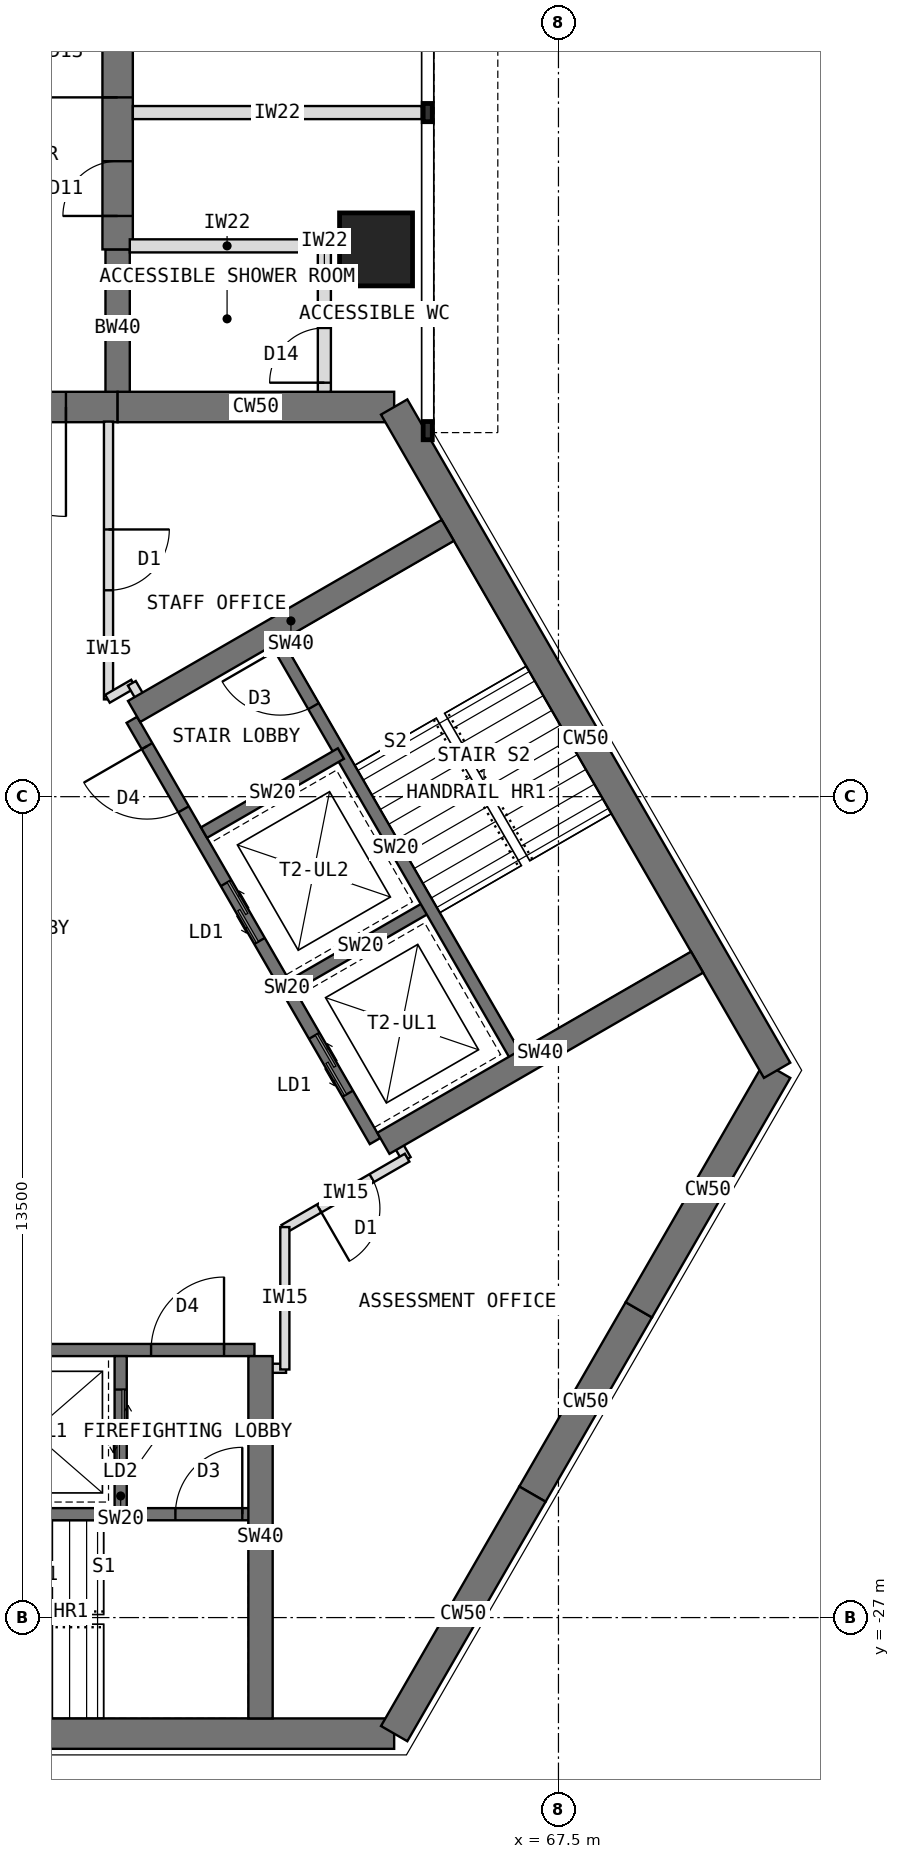
"""IFC4 building model, lengths in metres.
Left out: names, types, materials, properties, quantities, classifications, styles, units other than length and angle.
Written with IfcOpenShell. Run it as: python <this file> out.ifc"""

import sys

from ifc_helpers import new_model, si_unit, direction, frame, frame_2d, origin, origin_2d, place, context, subcontext, project, spatial, rectangle, extrude, element, fill, save


model = new_model("IFC4")
c1 = context("Model", 3, precision=1e-05, world=origin(), true_north=direction((0.0, 1.0)))
c2 = subcontext(c1, "Body", "Model", "MODEL_VIEW")
j1 = project(units=[si_unit("LENGTHUNIT", "METRE"), si_unit("PLANEANGLEUNIT", "RADIAN")], contexts=[c1])
p1 = place(None, origin())
s1 = spatial("IfcSite", under=j1, at=p1, CompositionType="ELEMENT")
p2 = place(p1, origin())
s2 = spatial("IfcBuilding", under=s1, at=p2, CompositionType="ELEMENT")
p3 = place(p2, frame((0.0, 0.0, 174.5)))
s3 = spatial("IfcBuildingStorey", under=s2, at=p3, CompositionType="ELEMENT", Elevation=174.5)
p4 = place(p3, frame((64.798, -7.092, 0.0), z_axis=(0.0, 0.0, 1.0), x_axis=(-1.0, 0.0, 0.0)))
e1 = element("IfcWall", 1, at=p4, inside=s3, PredefinedType="SHEAR", context=c2, shape_type="SweptSolid", body=[
    extrude(rectangle(XDim=4.548, YDim=0.5, at=frame_2d((2.274, 0.0))), origin(), (0.0, 0.0, 1.0), 4.0),
])
p5 = place(p3, frame((60.25, -7.092, 0.0), z_axis=(0.0, 0.0, 1.0), x_axis=(-1.0, 0.0, 0.0)))
e2 = element("IfcWall", 2, at=p5, inside=s3, PredefinedType="SHEAR", context=c2, shape_type="SweptSolid", body=[
    extrude(rectangle(XDim=3.5, YDim=0.5, at=frame_2d((1.75, 0.0))), origin(), (0.0, 0.0, 1.0), 4.0),
])
p6 = place(p5, frame((0.85, 0.0, 0.0)))
e3 = element("IfcOpeningElement", 3, at=p6, cuts=e2, PredefinedType="OPENING", context=c2, shape_type="SweptSolid", body=[
    extrude(rectangle(XDim=1.8, YDim=2.1, at=frame_2d((0.9, 1.05))), frame((0.0, 0.26, 0.0), z_axis=(0.0, -1.0, 0.0), x_axis=(1.0, 0.0, 0.0)), (0.0, 0.0, 1.0), 0.52),
])
p7 = place(p3, frame((52.202, -28.908, 0.0), z_axis=(0.0, 0.0, 1.0), x_axis=(1.0, 0.0, 0.0)))
e4 = element("IfcWall", 4, at=p7, inside=s3, PredefinedType="SHEAR", context=c2, shape_type="SweptSolid", body=[
    extrude(rectangle(XDim=12.596, YDim=0.5, at=frame_2d((6.298, 0.0))), origin(), (0.0, 0.0, 1.0), 4.0),
])
p8 = place(p3, frame((64.798, -28.908, 0.0), z_axis=(0.0, 0.0, 1.0), x_axis=(0.499984222037, 0.866034513004, 0.0)))
e5 = element("IfcWall", 5, at=p8, inside=s3, PredefinedType="SHEAR", context=c2, shape_type="SweptSolid", body=[
    extrude(rectangle(XDim=4.548, YDim=0.5, at=frame_2d((2.274, 0.0))), origin(), (0.0, 0.0, 1.0), 4.0),
])
p9 = place(p3, frame((67.072, -24.97, 0.0), z_axis=(0.0, 0.0, 1.0), x_axis=(0.500010275428, 0.866019471182, 0.0)))
e6 = element("IfcWall", 6, at=p9, inside=s3, PredefinedType="SHEAR", context=c2, shape_type="SweptSolid", body=[
    extrude(rectangle(XDim=3.5, YDim=0.5, at=frame_2d((1.75, 0.0))), origin(), (0.0, 0.0, 1.0), 4.0),
])
p10 = place(p3, frame((68.822, -21.939, 0.0), z_axis=(0.0, 0.0, 1.0), x_axis=(0.500024481964, 0.866011268655, 0.0)))
e7 = element("IfcWall", 7, at=p10, inside=s3, PredefinedType="SHEAR", context=c2, shape_type="SweptSolid", body=[
    extrude(rectangle(XDim=4.548, YDim=0.5, at=frame_2d((2.274, 0.0))), origin(), (0.0, 0.0, 1.0), 4.0),
])
p11 = place(p3, frame((71.096, -18.0, 0.0), z_axis=(0.0, 0.0, 1.0), x_axis=(-0.500005998175, 0.866021940709, 0.0)))
e8 = element("IfcWall", 8, at=p11, inside=s3, PredefinedType="SHEAR", context=c2, shape_type="SweptSolid", body=[
    extrude(rectangle(XDim=12.596, YDim=0.5, at=frame_2d((6.298, 0.0))), origin(), (0.0, 0.0, 1.0), 4.0),
])
p12 = place(p3, frame((60.25, -7.092, 0.0), z_axis=(0.0, 0.0, 1.0), x_axis=(0.0, 1.0, 0.0)))
e9 = element("IfcWall", 9, at=p12, inside=s3, PredefinedType="SHEAR", context=c2, shape_type="SweptSolid", body=[
    extrude(rectangle(XDim=2.592, YDim=0.4, at=frame_2d((1.296, 0.0))), origin(), (0.0, 0.0, 1.0), 4.0),
])
p13 = place(p3, frame((60.25, -4.5, 0.0), z_axis=(0.0, 0.0, 1.0), x_axis=(0.0, 1.0, 0.0)))
e10 = element("IfcWall", 10, at=p13, inside=s3, PredefinedType="SHEAR", context=c2, shape_type="SweptSolid", body=[
    extrude(rectangle(XDim=13.2, YDim=0.5, at=frame_2d((6.6, 0.0))), origin(), (0.0, 0.0, 1.0), 4.0),
])
p14 = place(p13, frame((0.55, 0.0, 0.0)))
e11 = element("IfcOpeningElement", 11, at=p14, cuts=e10, PredefinedType="OPENING", context=c2, shape_type="SweptSolid", body=[
    extrude(rectangle(XDim=0.9, YDim=2.1, at=frame_2d((0.45, 1.05))), frame((0.0, 0.26, 0.0), z_axis=(0.0, -1.0, 0.0), x_axis=(1.0, 0.0, 0.0)), (0.0, 0.0, 1.0), 0.52),
])
p15 = place(p13, frame((2.5, 0.0, 0.0)))
e12 = element("IfcOpeningElement", 12, at=p15, cuts=e10, PredefinedType="OPENING", context=c2, shape_type="SweptSolid", body=[
    extrude(rectangle(XDim=1.5, YDim=2.1, at=frame_2d((0.75, 1.05))), frame((0.0, 0.26, 0.0), z_axis=(0.0, -1.0, 0.0), x_axis=(1.0, 0.0, 0.0)), (0.0, 0.0, 1.0), 0.52),
])
p16 = place(p3, frame((64.5, -4.5, 0.0), z_axis=(0.0, 0.0, 1.0), x_axis=(1.0, 0.0, 0.0)))
e13 = element("IfcColumn", 13, at=p16, inside=s3, PredefinedType="COLUMN", context=c2, shape_type="SweptSolid", body=[
    extrude(rectangle(XDim=1.2, YDim=1.2, at=origin_2d()), origin(), (0.0, 0.0, 1.0), 4.0),
])
p17 = place(p3, frame((54.5, -22.6, 0.0), z_axis=(0.0, 0.0, 1.0), x_axis=(1.0, 0.0, 0.0)))
e14 = element("IfcWall", 14, at=p17, inside=s3, PredefinedType="SHEAR", context=c2, shape_type="SweptSolid", body=[
    extrude(rectangle(XDim=8.0, YDim=0.2, at=frame_2d((4.0, 0.0))), origin(), (0.0, 0.0, 1.0), 4.0),
])
p18 = place(p17, frame((6.3, 0.0, 0.0)))
e15 = element("IfcOpeningElement", 15, at=p18, cuts=e14, PredefinedType="OPENING", context=c2, shape_type="SweptSolid", body=[
    extrude(rectangle(XDim=1.2, YDim=2.1, at=frame_2d((0.6, 1.05))), frame((0.0, 0.11, 0.0), z_axis=(0.0, -1.0, 0.0), x_axis=(1.0, 0.0, 0.0)), (0.0, 0.0, 1.0), 0.22),
])
p19 = place(p17, frame((0.9, 0.0, 0.0)))
e16 = element("IfcOpeningElement", 16, at=p19, cuts=e14, PredefinedType="OPENING", context=c2, shape_type="SweptSolid", body=[
    extrude(rectangle(XDim=1.1, YDim=2.2, at=frame_2d((0.55, 1.1))), frame((0.0, 0.11, 0.0), z_axis=(0.0, -1.0, 0.0), x_axis=(1.0, 0.0, 0.0)), (0.0, 0.0, 1.0), 0.22),
])
p20 = place(p3, frame((60.3, -22.7, 0.0), z_axis=(0.0, 0.0, 1.0), x_axis=(0.0, -1.0, 0.0)))
e17 = element("IfcWall", 17, at=p20, inside=s3, PredefinedType="SHEAR", context=c2, shape_type="SweptSolid", body=[
    extrude(rectangle(XDim=2.6, YDim=0.2, at=frame_2d((1.3, 0.0))), origin(), (0.0, 0.0, 1.0), 4.0),
])
p21 = place(p20, frame((0.55, 0.0, 0.0)))
e18 = element("IfcOpeningElement", 18, at=p21, cuts=e17, PredefinedType="OPENING", context=c2, shape_type="SweptSolid", body=[
    extrude(rectangle(XDim=1.3, YDim=2.2, at=frame_2d((0.65, 1.1))), frame((0.0, 0.11, 0.0), z_axis=(0.0, -1.0, 0.0), x_axis=(1.0, 0.0, 0.0)), (0.0, 0.0, 1.0), 0.22),
])
p22 = place(p3, frame((54.5, -25.3, 0.0), z_axis=(0.0, 0.0, 1.0), x_axis=(1.0, 0.0, 0.0)))
e19 = element("IfcWall", 19, at=p22, inside=s3, PredefinedType="SHEAR", context=c2, shape_type="SweptSolid", body=[
    extrude(rectangle(XDim=8.0, YDim=0.2, at=frame_2d((4.0, 0.0))), origin(), (0.0, 0.0, 1.0), 4.0),
])
p23 = place(p22, frame((6.7, 0.0, 0.0)))
e20 = element("IfcOpeningElement", 20, at=p23, cuts=e19, PredefinedType="OPENING", context=c2, shape_type="SweptSolid", body=[
    extrude(rectangle(XDim=1.1, YDim=2.1, at=frame_2d((0.55, 1.05))), frame((0.0, 0.11, 0.0), z_axis=(0.0, -1.0, 0.0), x_axis=(1.0, 0.0, 0.0)), (0.0, 0.0, 1.0), 0.22),
])
p24 = place(p3, frame((62.6, -22.7, 0.0), z_axis=(0.0, 0.0, 1.0), x_axis=(0.0, -1.0, 0.0)))
e21 = element("IfcWall", 21, at=p24, inside=s3, PredefinedType="SHEAR", context=c2, shape_type="SweptSolid", body=[
    extrude(rectangle(XDim=5.958, YDim=0.4, at=frame_2d((2.979, 0.0))), origin(), (0.0, 0.0, 1.0), 4.0),
])
p25 = place(p3, frame((64.484, -19.164, 0.0), z_axis=(0.0, 0.0, 1.0), x_axis=(-0.49999894854, 0.866026010844, 0.0)))
e22 = element("IfcWall", 22, at=p25, inside=s3, PredefinedType="SHEAR", context=c2, shape_type="SweptSolid", body=[
    extrude(rectangle(XDim=8.0, YDim=0.2, at=frame_2d((4.0, 0.0))), origin(), (0.0, 0.0, 1.0), 4.0),
])
p26 = place(p25, frame((6.3, 0.0, 0.0)))
e23 = element("IfcOpeningElement", 23, at=p26, cuts=e22, PredefinedType="OPENING", context=c2, shape_type="SweptSolid", body=[
    extrude(rectangle(XDim=1.2, YDim=2.1, at=frame_2d((0.6, 1.05))), frame((0.0, 0.11, 0.0), z_axis=(0.0, -1.0, 0.0), x_axis=(1.0, 0.0, 0.0)), (0.0, 0.0, 1.0), 0.22),
])
p27 = place(p25, frame((0.9, 0.0, 0.0)))
e24 = element("IfcOpeningElement", 24, at=p27, cuts=e22, PredefinedType="OPENING", context=c2, shape_type="SweptSolid", body=[
    extrude(rectangle(XDim=1.1, YDim=2.2, at=frame_2d((0.55, 1.1))), frame((0.0, 0.11, 0.0), z_axis=(0.0, -1.0, 0.0), x_axis=(1.0, 0.0, 0.0)), (0.0, 0.0, 1.0), 0.22),
])
p28 = place(p25, frame((3.8, 0.0, 0.0)))
e25 = element("IfcOpeningElement", 25, at=p28, cuts=e22, PredefinedType="OPENING", context=c2, shape_type="SweptSolid", body=[
    extrude(rectangle(XDim=1.1, YDim=2.2, at=frame_2d((0.55, 1.1))), frame((0.0, 0.11, 0.0), z_axis=(0.0, -1.0, 0.0), x_axis=(1.0, 0.0, 0.0)), (0.0, 0.0, 1.0), 0.22),
])
p29 = place(p3, frame((63.12, -16.603, 0.0), z_axis=(0.0, 0.0, 1.0), x_axis=(0.866062058628, 0.499936506574, 0.0)))
e26 = element("IfcWall", 26, at=p29, inside=s3, PredefinedType="SHEAR", context=c2, shape_type="SweptSolid", body=[
    extrude(rectangle(XDim=2.6, YDim=0.2, at=frame_2d((1.3, 0.0))), origin(), (0.0, 0.0, 1.0), 4.0),
])
p30 = place(p3, frame((61.67, -14.091, 0.0), z_axis=(0.0, 0.0, 1.0), x_axis=(0.86603858612, 0.49997716683, 0.0)))
e27 = element("IfcWall", 27, at=p30, inside=s3, PredefinedType="SHEAR", context=c2, shape_type="SweptSolid", body=[
    extrude(rectangle(XDim=2.6, YDim=0.2, at=frame_2d((1.3, 0.0))), origin(), (0.0, 0.0, 1.0), 4.0),
])
p31 = place(p3, frame((66.822, -17.814, 0.0), z_axis=(0.0, 0.0, 1.0), x_axis=(-0.49999894854, 0.866026010844, 0.0)))
e28 = element("IfcWall", 28, at=p31, inside=s3, PredefinedType="SHEAR", context=c2, shape_type="SweptSolid", body=[
    extrude(rectangle(XDim=8.0, YDim=0.2, at=frame_2d((4.0, 0.0))), origin(), (0.0, 0.0, 1.0), 4.0),
])
p32 = place(p31, frame((6.7, 0.0, 0.0)))
e29 = element("IfcOpeningElement", 29, at=p32, cuts=e28, PredefinedType="OPENING", context=c2, shape_type="SweptSolid", body=[
    extrude(rectangle(XDim=1.1, YDim=2.1, at=frame_2d((0.55, 1.05))), frame((0.0, 0.11, 0.0), z_axis=(0.0, -1.0, 0.0), x_axis=(1.0, 0.0, 0.0)), (0.0, 0.0, 1.0), 0.22),
])
p33 = place(p3, frame((60.52, -12.099, 0.0), z_axis=(0.0, 0.0, 1.0), x_axis=(0.86602319114, 0.500003832394, 0.0)))
e30 = element("IfcWall", 30, at=p33, inside=s3, PredefinedType="SHEAR", context=c2, shape_type="SweptSolid", body=[
    extrude(rectangle(XDim=5.958, YDim=0.4, at=frame_2d((2.979, 0.0))), origin(), (0.0, 0.0, 1.0), 4.0),
])
p34 = place(p3, frame((64.62, -19.201, 0.0), z_axis=(0.0, 0.0, 1.0), x_axis=(0.866012946976, 0.500021575205, 0.0)))
e31 = element("IfcWall", 31, at=p34, inside=s3, PredefinedType="SHEAR", context=c2, shape_type="SweptSolid", body=[
    extrude(rectangle(XDim=5.958, YDim=0.4, at=frame_2d((2.979, 0.0))), origin(), (0.0, 0.0, 1.0), 4.0),
])
p35 = place(p3, frame((60.5, -2.25, 0.0), z_axis=(0.0, 0.0, 1.0), x_axis=(1.0, 0.0, 0.0)))
e32 = element("IfcWall", 32, at=p35, inside=s3, PredefinedType="PARTITIONING", context=c2, shape_type="SweptSolid", body=[
    extrude(rectangle(XDim=4.75, YDim=0.215, at=frame_2d((2.375, 0.0))), origin(), (0.0, 0.0, 1.0), 3.8),
])
p36 = place(p3, frame((63.65, -6.842, 0.0), z_axis=(0.0, 0.0, 1.0), x_axis=(0.0, 1.0, 0.0)))
e33 = element("IfcWall", 33, at=p36, inside=s3, PredefinedType="PARTITIONING", context=c2, shape_type="SweptSolid", body=[
    extrude(rectangle(XDim=2.4, YDim=0.215, at=frame_2d((1.2, 0.0))), origin(), (0.0, 0.0, 1.0), 3.8),
])
p37 = place(p36, frame((0.15, 0.0, 0.0)))
e34 = element("IfcOpeningElement", 34, at=p37, cuts=e33, PredefinedType="OPENING", context=c2, shape_type="SweptSolid", body=[
    extrude(rectangle(XDim=0.9, YDim=2.1, at=frame_2d((0.45, 1.05))), frame((0.0, 0.117, 0.0), z_axis=(0.0, -1.0, 0.0), x_axis=(1.0, 0.0, 0.0)), (0.0, 0.0, 1.0), 0.235),
])
p38 = place(p3, frame((60.45, -4.442, 0.0), z_axis=(0.0, 0.0, 1.0), x_axis=(1.0, 0.0, 0.0)))
e35 = element("IfcWall", 35, at=p38, inside=s3, PredefinedType="PARTITIONING", context=c2, shape_type="SweptSolid", body=[
    extrude(rectangle(XDim=3.2, YDim=0.215, at=frame_2d((1.6, 0.0))), origin(), (0.0, 0.0, 1.0), 3.267),
])
p39 = place(p3, frame((63.02, -22.9, 0.0), z_axis=(0.0, 0.0, 1.0), x_axis=(-1.0, 0.0, 0.0)))
e36 = element("IfcWall", 36, at=p39, inside=s3, PredefinedType="PARTITIONING", context=c2, shape_type="SweptSolid", body=[
    extrude(rectangle(XDim=0.43, YDim=0.15, at=frame_2d((0.215, 0.0))), origin(), (0.0, 0.0, 1.0), 3.8),
])
p40 = place(p3, frame((60.1, -7.332, 0.0), z_axis=(0.0, 0.0, 1.0), x_axis=(0.0, -1.0, 0.0)))
e37 = element("IfcWall", 37, at=p40, inside=s3, PredefinedType="PARTITIONING", context=c2, shape_type="SweptSolid", body=[
    extrude(rectangle(XDim=4.568, YDim=0.15, at=frame_2d((2.284, 0.0))), origin(), (0.0, 0.0, 1.0), 3.8),
])
p41 = place(p40, frame((1.774, 0.0, 0.0)))
e38 = element("IfcOpeningElement", 38, at=p41, cuts=e37, PredefinedType="OPENING", context=c2, shape_type="SweptSolid", body=[
    extrude(rectangle(XDim=1.0, YDim=2.1, at=frame_2d((0.5, 1.05))), frame((0.0, 0.085, 0.0), z_axis=(0.0, -1.0, 0.0), x_axis=(1.0, 0.0, 0.0)), (0.0, 0.0, 1.0), 0.17),
])
p42 = place(p3, frame((60.083, -11.89, 0.0), z_axis=(0.0, 0.0, 1.0), x_axis=(0.865831790172, 0.50033519877, 0.0)))
e39 = element("IfcWall", 39, at=p42, inside=s3, PredefinedType="PARTITIONING", context=c2, shape_type="SweptSolid", body=[
    extrude(rectangle(XDim=0.494, YDim=0.15, at=frame_2d((0.247, 0.0))), origin(), (0.0, 0.0, 1.0), 3.8),
])
for number, where, z_axis, x_axis in (
    (40, (60.483, -11.635, 0.0), (0.0, 0.0, 1.0), (0.5, -0.866, 0.0)),
    (41, (64.789, -19.092, 0.0), (0.0, 0.0, 1.0), (0.5, -0.866, 0.0)),
):
    element("IfcWall", number, at=place(p3, frame(where, z_axis=z_axis, x_axis=x_axis)), inside=s3, PredefinedType="PARTITIONING", context=c2, shape_type="SweptSolid", body=[
        extrude(rectangle(XDim=0.43, YDim=0.15, at=frame_2d((0.215, 0.0))), origin(), (0.0, 0.0, 1.0), 3.8),
    ])
p43 = place(p3, frame((65.011, -19.437, 0.0), z_axis=(0.0, 0.0, 1.0), x_axis=(-0.865982457891, -0.500074377092, 0.0)))
e42 = element("IfcWall", 42, at=p43, inside=s3, PredefinedType="PARTITIONING", context=c2, shape_type="SweptSolid", body=[
    extrude(rectangle(XDim=2.342, YDim=0.15, at=frame_2d((1.171, 0.0))), origin(), (0.0, 0.0, 1.0), 3.8),
])
p44 = place(p43, frame((0.671, 0.0, 0.0)))
e43 = element("IfcOpeningElement", 43, at=p44, cuts=e42, PredefinedType="OPENING", context=c2, shape_type="SweptSolid", body=[
    extrude(rectangle(XDim=1.0, YDim=2.1, at=frame_2d((0.5, 1.05))), frame((0.0, 0.085, 0.0), z_axis=(0.0, -1.0, 0.0), x_axis=(1.0, 0.0, 0.0)), (0.0, 0.0, 1.0), 0.17),
])
p45 = place(p3, frame((63.0, -20.578, 0.0), z_axis=(0.0, 0.0, 1.0), x_axis=(0.0, -1.0, 0.0)))
e44 = element("IfcWall", 44, at=p45, inside=s3, PredefinedType="PARTITIONING", context=c2, shape_type="SweptSolid", body=[
    extrude(rectangle(XDim=2.342, YDim=0.15, at=frame_2d((1.171, 0.0))), origin(), (0.0, 0.0, 1.0), 3.8),
])
p46 = place(p18, origin())
e45 = element("IfcDoor", 45, at=p46, inside=s3, OperationType="SINGLE_SWING_RIGHT", PredefinedType="DOOR", context=c2, shape_type="SweptSolid", body=[
    extrude(rectangle(XDim=1.2, YDim=2.1, at=frame_2d((0.6, 1.05))), frame((0.0, 0.025, 0.0), z_axis=(0.0, -1.0, 0.0), x_axis=(1.0, 0.0, 0.0)), (0.0, 0.0, 1.0), 0.05),
])
fill(e15, e45)
p47 = place(p21, origin())
e46 = element("IfcDoor", 46, at=p47, inside=s3, OperationType="DOUBLE_DOOR_SLIDING", PredefinedType="DOOR", context=c2, shape_type="SweptSolid", body=[
    extrude(rectangle(XDim=1.3, YDim=2.2, at=frame_2d((0.65, 1.1))), frame((0.0, 0.025, 0.0), z_axis=(0.0, -1.0, 0.0), x_axis=(1.0, 0.0, 0.0)), (0.0, 0.0, 1.0), 0.05),
])
fill(e18, e46)
p48 = place(p23, origin())
e47 = element("IfcDoor", 47, at=p48, inside=s3, OperationType="SINGLE_SWING_RIGHT", PredefinedType="DOOR", context=c2, shape_type="SweptSolid", body=[
    extrude(rectangle(XDim=1.1, YDim=2.1, at=frame_2d((0.55, 1.05))), frame((0.0, 0.025, 0.0), z_axis=(0.0, -1.0, 0.0), x_axis=(1.0, 0.0, 0.0)), (0.0, 0.0, 1.0), 0.05),
])
fill(e20, e47)
p49 = place(p26, origin())
e48 = element("IfcDoor", 48, at=p49, inside=s3, OperationType="SINGLE_SWING_RIGHT", PredefinedType="DOOR", context=c2, shape_type="SweptSolid", body=[
    extrude(rectangle(XDim=1.2, YDim=2.1, at=frame_2d((0.6, 1.05))), frame((0.0, 0.025, 0.0), z_axis=(0.0, -1.0, 0.0), x_axis=(1.0, 0.0, 0.0)), (0.0, 0.0, 1.0), 0.05),
])
fill(e23, e48)
p50 = place(p27, origin())
e49 = element("IfcDoor", 49, at=p50, inside=s3, OperationType="DOUBLE_DOOR_SLIDING", PredefinedType="DOOR", context=c2, shape_type="SweptSolid", body=[
    extrude(rectangle(XDim=1.1, YDim=2.2, at=frame_2d((0.55, 1.1))), frame((0.0, 0.025, 0.0), z_axis=(0.0, -1.0, 0.0), x_axis=(1.0, 0.0, 0.0)), (0.0, 0.0, 1.0), 0.05),
])
fill(e24, e49)
p51 = place(p28, origin())
e50 = element("IfcDoor", 50, at=p51, inside=s3, OperationType="DOUBLE_DOOR_SLIDING", PredefinedType="DOOR", context=c2, shape_type="SweptSolid", body=[
    extrude(rectangle(XDim=1.1, YDim=2.2, at=frame_2d((0.55, 1.1))), frame((0.0, 0.025, 0.0), z_axis=(0.0, -1.0, 0.0), x_axis=(1.0, 0.0, 0.0)), (0.0, 0.0, 1.0), 0.05),
])
fill(e25, e50)
p52 = place(p32, origin())
e51 = element("IfcDoor", 51, at=p52, inside=s3, OperationType="SINGLE_SWING_RIGHT", PredefinedType="DOOR", context=c2, shape_type="SweptSolid", body=[
    extrude(rectangle(XDim=1.1, YDim=2.1, at=frame_2d((0.55, 1.05))), frame((0.0, 0.025, 0.0), z_axis=(0.0, -1.0, 0.0), x_axis=(1.0, 0.0, 0.0)), (0.0, 0.0, 1.0), 0.05),
])
fill(e29, e51)
p53 = place(p6, origin())
e52 = element("IfcDoor", 52, at=p53, inside=s3, OperationType="DOUBLE_DOOR_DOUBLE_SWING", PredefinedType="DOOR", context=c2, shape_type="SweptSolid", body=[
    extrude(rectangle(XDim=1.8, YDim=2.1, at=frame_2d((0.9, 1.05))), frame((0.0, 0.025, 0.0), z_axis=(0.0, -1.0, 0.0), x_axis=(1.0, 0.0, 0.0)), (0.0, 0.0, 1.0), 0.05),
])
fill(e3, e52)
p54 = place(p37, origin())
e53 = element("IfcDoor", 53, at=p54, inside=s3, OperationType="SINGLE_SWING_LEFT", PredefinedType="DOOR", context=c2, shape_type="SweptSolid", body=[
    extrude(rectangle(XDim=0.9, YDim=2.1, at=frame_2d((0.45, 1.05))), frame((0.0, 0.025, 0.0), z_axis=(0.0, -1.0, 0.0), x_axis=(1.0, 0.0, 0.0)), (0.0, 0.0, 1.0), 0.05),
])
fill(e34, e53)
p55 = place(p44, origin())
e54 = element("IfcDoor", 54, at=p55, inside=s3, OperationType="SINGLE_SWING_RIGHT", PredefinedType="DOOR", context=c2, shape_type="SweptSolid", body=[
    extrude(rectangle(XDim=1.0, YDim=2.1, at=frame_2d((0.5, 1.05))), frame((0.0, 0.025, 0.0), z_axis=(0.0, -1.0, 0.0), x_axis=(1.0, 0.0, 0.0)), (0.0, 0.0, 1.0), 0.05),
])
fill(e43, e54)
p56 = place(p41, origin())
e55 = element("IfcDoor", 55, at=p56, inside=s3, OperationType="SINGLE_SWING_LEFT", PredefinedType="DOOR", context=c2, shape_type="SweptSolid", body=[
    extrude(rectangle(XDim=1.0, YDim=2.1, at=frame_2d((0.5, 1.05))), frame((0.0, 0.025, 0.0), z_axis=(0.0, -1.0, 0.0), x_axis=(1.0, 0.0, 0.0)), (0.0, 0.0, 1.0), 0.05),
])
fill(e38, e55)
p57 = place(p14, origin())
e56 = element("IfcDoor", 56, at=p57, inside=s3, OperationType="SINGLE_SWING_LEFT", PredefinedType="DOOR", context=c2, shape_type="SweptSolid", body=[
    extrude(rectangle(XDim=0.9, YDim=2.1, at=frame_2d((0.45, 1.05))), frame((0.0, 0.025, 0.0), z_axis=(0.0, -1.0, 0.0), x_axis=(1.0, 0.0, 0.0)), (0.0, 0.0, 1.0), 0.05),
])
fill(e11, e56)
p58 = place(p15, origin())
e57 = element("IfcDoor", 57, at=p58, inside=s3, OperationType="DOUBLE_DOOR_SINGLE_SWING", PredefinedType="DOOR", context=c2, shape_type="SweptSolid", body=[
    extrude(rectangle(XDim=1.5, YDim=2.1, at=frame_2d((0.75, 1.05))), frame((0.0, 0.025, 0.0), z_axis=(0.0, -1.0, 0.0), x_axis=(1.0, 0.0, 0.0)), (0.0, 0.0, 1.0), 0.05),
])
fill(e12, e57)
save(model, sys.argv[1])
